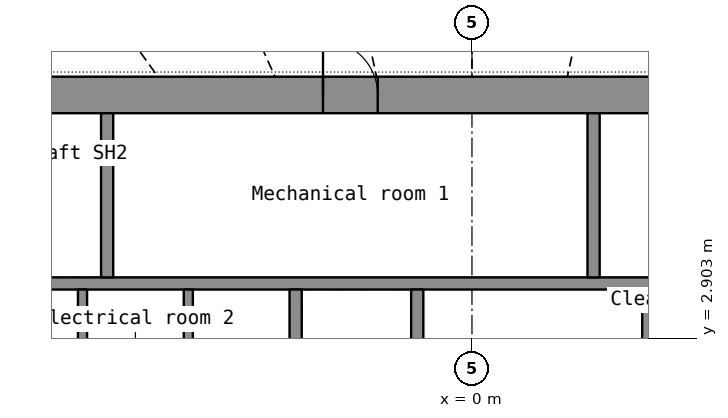
"""IFC4 building model, lengths in metres.
Left out: names, types, materials, properties, quantities, classifications, styles, units other than length and angle.
Written with IfcOpenShell. Run it as: python <this file> out.ifc"""

import sys

from ifc_helpers import new_model, si_unit, direction, frame, frame_2d, origin, place, context, subcontext, project, spatial, rectangle, extrude, element, fill, save


model = new_model("IFC4")
c1 = context("Model", 3, precision=1e-05, world=origin(), true_north=direction((0.0, 1.0)))
c2 = subcontext(c1, "Body", "Model", "MODEL_VIEW")
j1 = project(units=[si_unit("LENGTHUNIT", "METRE"), si_unit("PLANEANGLEUNIT", "RADIAN")], contexts=[c1])
p1 = place(None, origin())
s1 = spatial("IfcSite", under=j1, at=p1, CompositionType="ELEMENT")
p2 = place(p1, origin())
s2 = spatial("IfcBuilding", under=s1, at=p2, CompositionType="ELEMENT")
p3 = place(p2, frame((0.0, 0.0, 59.3)))
s3 = spatial("IfcBuildingStorey", under=s2, at=p3, CompositionType="ELEMENT", Elevation=59.3)
p4 = place(p3, frame((-11.4, 6.9, 0.0), z_axis=(0.0, 0.0, 1.0), x_axis=(1.0, 0.0, 0.0)))
e1 = element("IfcWall", 1, at=p4, inside=s3, PredefinedType="SHEAR", context=c2, shape_type="SweptSolid", body=[
    extrude(rectangle(XDim=22.8, YDim=0.6, at=frame_2d((11.4, 0.0))), origin(), (0.0, 0.0, 1.0), 3.3),
])
p5 = place(p4, frame((1.85, 0.0, 0.0)))
e2 = element("IfcOpeningElement", 2, at=p5, cuts=e1, PredefinedType="OPENING", context=c2, shape_type="SweptSolid", body=[
    extrude(rectangle(XDim=1.1, YDim=2.2, at=frame_2d((0.55, 1.1))), frame((0.0, 0.31, 0.0), z_axis=(0.0, -1.0, 0.0), x_axis=(1.0, 0.0, 0.0)), (0.0, 0.0, 1.0), 0.62),
])
p6 = place(p4, frame((8.95, 0.0, 0.0)))
e3 = element("IfcOpeningElement", 3, at=p6, cuts=e1, PredefinedType="OPENING", context=c2, shape_type="SweptSolid", body=[
    extrude(rectangle(XDim=0.9, YDim=2.1, at=frame_2d((0.45, 1.05))), frame((0.0, 0.31, 0.0), z_axis=(0.0, -1.0, 0.0), x_axis=(1.0, 0.0, 0.0)), (0.0, 0.0, 1.0), 0.62),
])
p7 = place(p4, frame((14.95, 0.0, 0.0)))
e4 = element("IfcOpeningElement", 4, at=p7, cuts=e1, PredefinedType="OPENING", context=c2, shape_type="SweptSolid", body=[
    extrude(rectangle(XDim=0.9, YDim=2.1, at=frame_2d((0.45, 1.05))), frame((0.0, 0.31, 0.0), z_axis=(0.0, -1.0, 0.0), x_axis=(1.0, 0.0, 0.0)), (0.0, 0.0, 1.0), 0.62),
])
p8 = place(p4, frame((18.95, 0.0, 0.0)))
e5 = element("IfcOpeningElement", 5, at=p8, cuts=e1, PredefinedType="OPENING", context=c2, shape_type="SweptSolid", body=[
    extrude(rectangle(XDim=0.9, YDim=2.1, at=frame_2d((0.45, 1.05))), frame((0.0, 0.31, 0.0), z_axis=(0.0, -1.0, 0.0), x_axis=(1.0, 0.0, 0.0)), (0.0, 0.0, 1.0), 0.62),
])
p9 = place(p4, frame((0.25, 0.0, 0.0)))
e6 = element("IfcOpeningElement", 6, at=p9, cuts=e1, PredefinedType="OPENING", context=c2, shape_type="SweptSolid", body=[
    extrude(rectangle(XDim=0.8, YDim=2.05, at=frame_2d((0.4, 1.025))), frame((0.0, 0.31, 0.0), z_axis=(0.0, -1.0, 0.0), x_axis=(1.0, 0.0, 0.0)), (0.0, 0.0, 1.0), 0.62),
])
p10 = place(p4, frame((21.75, 0.0, 0.0)))
e7 = element("IfcOpeningElement", 7, at=p10, cuts=e1, PredefinedType="OPENING", context=c2, shape_type="SweptSolid", body=[
    extrude(rectangle(XDim=0.8, YDim=2.05, at=frame_2d((0.4, 1.025))), frame((0.0, 0.31, 0.0), z_axis=(0.0, -1.0, 0.0), x_axis=(1.0, 0.0, 0.0)), (0.0, 0.0, 1.0), 0.62),
])
p11 = place(p3, frame((-11.4, 3.8, 0.0), z_axis=(0.0, 0.0, 1.0), x_axis=(1.0, 0.0, 0.0)))
e8 = element("IfcWall", 8, at=p11, inside=s3, PredefinedType="SHEAR", context=c2, shape_type="SweptSolid", body=[
    extrude(rectangle(XDim=22.8, YDim=0.2, at=frame_2d((11.4, 0.0))), origin(), (0.0, 0.0, 1.0), 3.3),
])
p12 = place(p3, frame((-6.0, 3.9, 0.0), z_axis=(0.0, 0.0, 1.0), x_axis=(0.0, 1.0, 0.0)))
e9 = element("IfcWall", 9, at=p12, inside=s3, PredefinedType="SHEAR", context=c2, shape_type="SweptSolid", body=[
    extrude(rectangle(XDim=2.7, YDim=0.2, at=frame_2d((1.35, 0.0))), origin(), (0.0, 0.0, 1.0), 3.3),
])
p13 = place(p3, frame((2.0, 3.9, 0.0), z_axis=(0.0, 0.0, 1.0), x_axis=(0.0, 1.0, 0.0)))
e10 = element("IfcWall", 10, at=p13, inside=s3, PredefinedType="PARTITIONING", context=c2, shape_type="SweptSolid", body=[
    extrude(rectangle(XDim=2.7, YDim=0.2, at=frame_2d((1.35, 0.0))), origin(), (0.0, 0.0, 1.0), 3.3),
])
p14 = place(p3, frame((-2.9, -3.7, 0.0), z_axis=(0.0, 0.0, 1.0), x_axis=(0.0, 1.0, 0.0)))
e11 = element("IfcWall", 11, at=p14, inside=s3, PredefinedType="SHEAR", context=c2, shape_type="SweptSolid", body=[
    extrude(rectangle(XDim=7.4, YDim=0.2, at=frame_2d((3.7, 0.0))), origin(), (0.0, 0.0, 1.0), 3.3),
])
p15 = place(p14, frame((3.1, 0.0, 0.0)))
e12 = element("IfcOpeningElement", 12, at=p15, cuts=e11, PredefinedType="OPENING", context=c2, shape_type="SweptSolid", body=[
    extrude(rectangle(XDim=1.2, YDim=2.2, at=frame_2d((0.6, 1.1))), frame((0.0, 0.11, 0.0), z_axis=(0.0, -1.0, 0.0), x_axis=(1.0, 0.0, 0.0)), (0.0, 0.0, 1.0), 0.22),
])
p16 = place(p3, frame((2.9, -3.7, 0.0), z_axis=(0.0, 0.0, 1.0), x_axis=(0.0, 1.0, 0.0)))
e13 = element("IfcWall", 13, at=p16, inside=s3, PredefinedType="SHEAR", context=c2, shape_type="SweptSolid", body=[
    extrude(rectangle(XDim=7.4, YDim=0.2, at=frame_2d((3.7, 0.0))), origin(), (0.0, 0.0, 1.0), 3.3),
])
p17 = place(p16, frame((3.1, 0.0, 0.0)))
e14 = element("IfcOpeningElement", 14, at=p17, cuts=e13, PredefinedType="OPENING", context=c2, shape_type="SweptSolid", body=[
    extrude(rectangle(XDim=1.2, YDim=2.2, at=frame_2d((0.6, 1.1))), frame((0.0, 0.11, 0.0), z_axis=(0.0, -1.0, 0.0), x_axis=(1.0, 0.0, 0.0)), (0.0, 0.0, 1.0), 0.22),
])
p18 = place(p3, frame((-0.9, 1.35, 0.0), z_axis=(0.0, 0.0, 1.0), x_axis=(0.0, 1.0, 0.0)))
e15 = element("IfcWall", 15, at=p18, inside=s3, PredefinedType="SHEAR", context=c2, shape_type="SweptSolid", body=[
    extrude(rectangle(XDim=2.35, YDim=0.2, at=frame_2d((1.175, 0.0))), origin(), (0.0, 0.0, 1.0), 3.3),
])
for number, where, z_axis, x_axis in (
    (16, (-6.405, 1.35, 0.0), (0.0, 0.0, 1.0), (0.0, 1.0, 0.0)),
    (17, (-4.665, 1.35, 0.0), (0.0, 0.0, 1.0), (0.0, 1.0, 0.0)),
):
    element("IfcWall", number, at=place(p3, frame(where, z_axis=z_axis, x_axis=x_axis)), inside=s3, PredefinedType="PARTITIONING", context=c2, shape_type="SweptSolid", body=[
        extrude(rectangle(XDim=2.35, YDim=0.15, at=frame_2d((1.175, 0.0))), origin(), (0.0, 0.0, 1.0), 3.3),
    ])
p19 = place(p6, origin())
e18 = element("IfcDoor", 18, at=p19, inside=s3, OperationType="SINGLE_SWING_LEFT", PredefinedType="DOOR", context=c2, shape_type="SweptSolid", body=[
    extrude(rectangle(XDim=0.9, YDim=2.1, at=frame_2d((0.45, 1.05))), frame((0.0, 0.025, 0.0), z_axis=(0.0, -1.0, 0.0), x_axis=(1.0, 0.0, 0.0)), (0.0, 0.0, 1.0), 0.05),
])
fill(e3, e18)
save(model, sys.argv[1])
